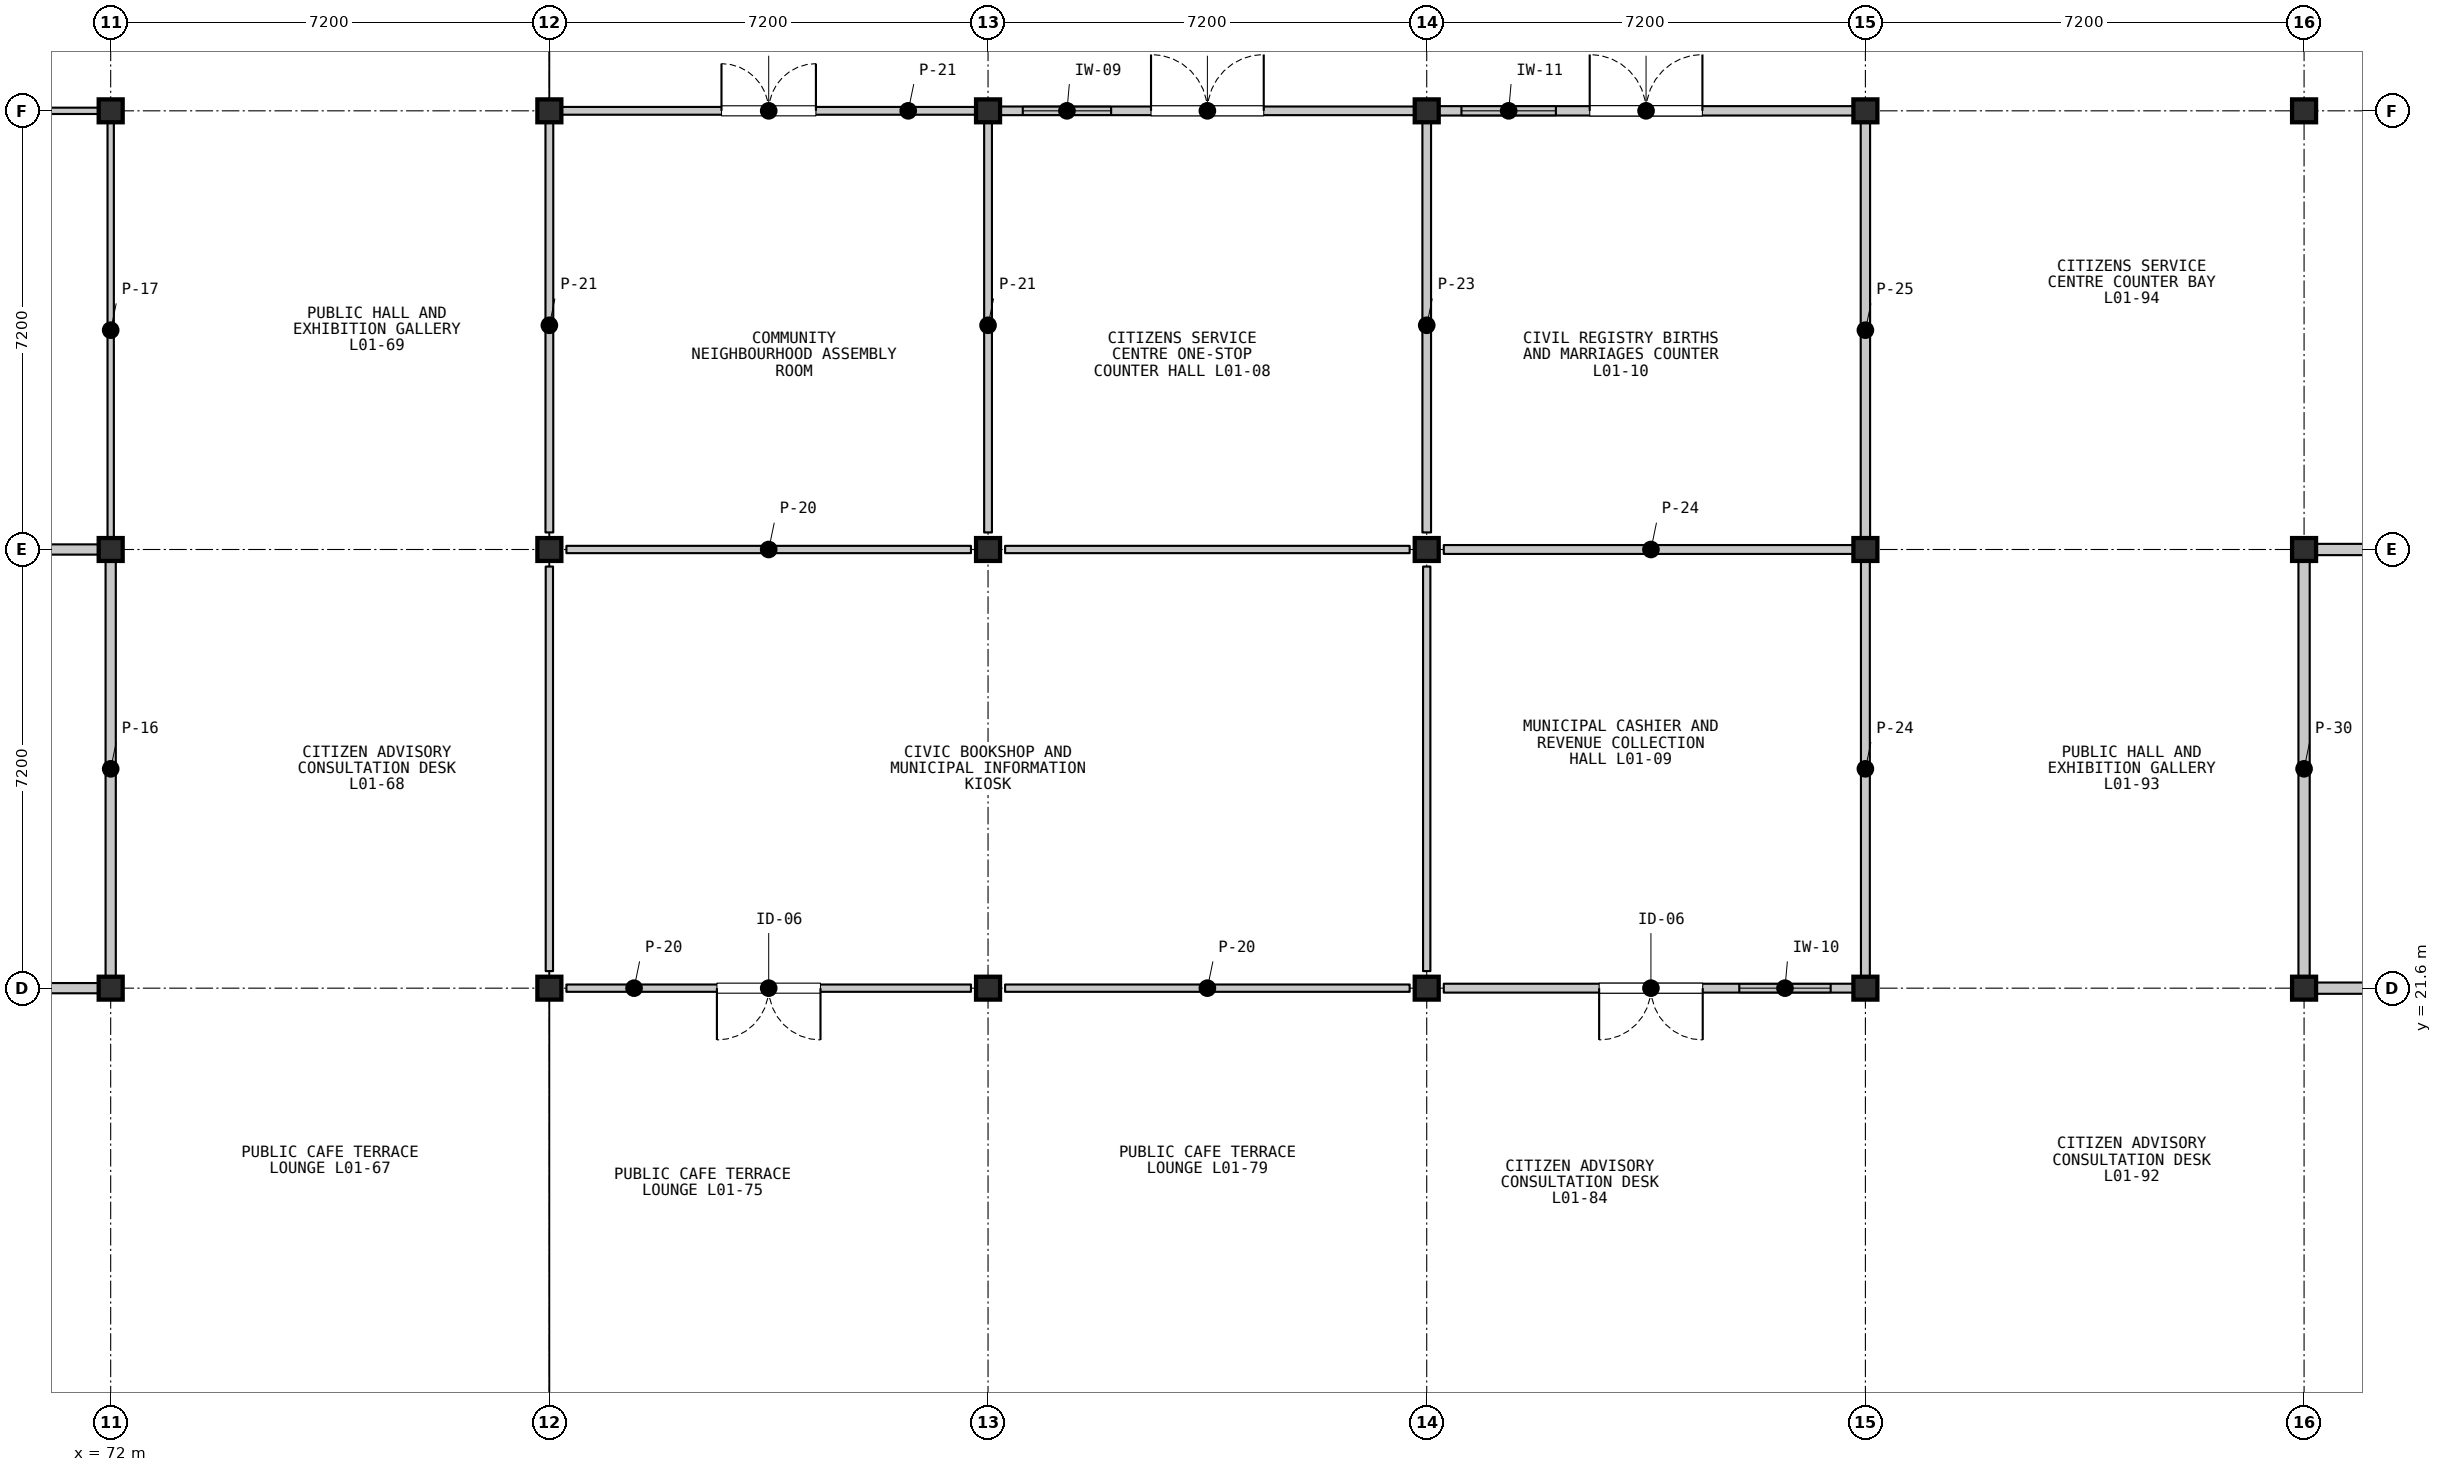
"""IFC4 building model, lengths in metres.
Left out: names, types, materials, properties, quantities, classifications, styles, units other than length and angle.
Written with IfcOpenShell. Run it as: python <this file> out.ifc"""

import sys

from ifc_helpers import new_model, si_unit, direction, frame, frame_2d, origin, origin_2d, place, context, subcontext, project, spatial, rectangle, i_section, extrude, element, fill, save


model = new_model("IFC4")
c1 = context("Model", 3, precision=1e-05, world=origin(), true_north=direction((0.0, 1.0)))
c2 = subcontext(c1, "Body", "Model", "MODEL_VIEW")
j1 = project(units=[si_unit("LENGTHUNIT", "METRE"), si_unit("PLANEANGLEUNIT", "RADIAN")], contexts=[c1])
p1 = place(None, origin())
s1 = spatial("IfcSite", under=j1, at=p1, CompositionType="ELEMENT")
p2 = place(p1, origin())
s2 = spatial("IfcBuilding", under=s1, at=p2, CompositionType="ELEMENT")
p3 = place(p2, origin())
s3 = spatial("IfcBuildingStorey", under=s2, at=p3, CompositionType="ELEMENT", Elevation=0.0)
for number, where, z_axis, x_axis in (
    (1, (72.0, 21.6, 0.0), (0.0, 0.0, 1.0), (1.0, 0.0, 0.0)),
    (2, (72.0, 28.8, 0.0), (0.0, 0.0, 1.0), (1.0, 0.0, 0.0)),
    (3, (72.0, 36.0, 0.0), (0.0, 0.0, 1.0), (1.0, 0.0, 0.0)),
    (4, (79.2, 21.6, 0.0), (0.0, 0.0, 1.0), (1.0, 0.0, 0.0)),
    (5, (79.2, 28.8, 0.0), (0.0, 0.0, 1.0), (1.0, 0.0, 0.0)),
    (6, (79.2, 36.0, 0.0), (0.0, 0.0, 1.0), (1.0, 0.0, 0.0)),
    (7, (86.4, 21.6, 0.0), (0.0, 0.0, 1.0), (1.0, 0.0, 0.0)),
    (8, (86.4, 28.8, 0.0), (0.0, 0.0, 1.0), (1.0, 0.0, 0.0)),
    (9, (86.4, 36.0, 0.0), (0.0, 0.0, 1.0), (1.0, 0.0, 0.0)),
    (10, (93.6, 21.6, 0.0), (0.0, 0.0, 1.0), (1.0, 0.0, 0.0)),
    (11, (93.6, 28.8, 0.0), (0.0, 0.0, 1.0), (1.0, 0.0, 0.0)),
    (12, (93.6, 36.0, 0.0), (0.0, 0.0, 1.0), (1.0, 0.0, 0.0)),
    (13, (100.8, 21.6, 0.0), (0.0, 0.0, 1.0), (1.0, 0.0, 0.0)),
    (14, (100.8, 28.8, 0.0), (0.0, 0.0, 1.0), (1.0, 0.0, 0.0)),
    (15, (100.8, 36.0, 0.0), (0.0, 0.0, 1.0), (1.0, 0.0, 0.0)),
    (16, (108.0, 21.6, 0.0), (0.0, 0.0, 1.0), (1.0, 0.0, 0.0)),
    (17, (108.0, 28.8, 0.0), (0.0, 0.0, 1.0), (1.0, 0.0, 0.0)),
    (18, (108.0, 36.0, 0.0), (0.0, 0.0, 1.0), (1.0, 0.0, 0.0)),
):
    element("IfcColumn", number, at=place(p3, frame(where, z_axis=z_axis, x_axis=x_axis)), inside=s3, PredefinedType="COLUMN", context=c2, shape_type="SweptSolid", body=[
        extrude(i_section(OverallWidth=0.394, OverallDepth=0.376, WebThickness=0.017, FlangeThickness=0.028, FilletRadius=0.015, at=origin_2d()), origin(), (0.0, 0.0, 1.0), 5.4),
    ])
p4 = place(p3, frame((71.88, 21.6, 0.0), z_axis=(0.0, 0.0, 1.0), x_axis=(-1.0, 0.0, 0.0)))
e19 = element("IfcWall", 19, at=p4, inside=s3, PredefinedType="PARTITIONING", context=c2, shape_type="SweptSolid", body=[
    extrude(rectangle(XDim=6.96, YDim=0.168, at=frame_2d((3.48, 0.0))), origin(), (0.0, 0.0, 1.0), 4.164),
])
p5 = place(p4, frame((2.63, 0.0, 0.0)))
e20 = element("IfcOpeningElement", 20, at=p5, cuts=e19, PredefinedType="OPENING", context=c2, shape_type="SweptSolid", body=[
    extrude(rectangle(XDim=1.7, YDim=2.35, at=frame_2d((0.85, 1.175))), frame((0.0, 0.094, 0.0), z_axis=(0.0, -1.0, 0.0), x_axis=(1.0, 0.0, 0.0)), (0.0, 0.0, 1.0), 0.188),
])
for number, where, z_axis, x_axis in (
    (21, (64.92, 28.8, 0.0), (0.0, 0.0, 1.0), (1.0, 0.0, 0.0)),
    (22, (72.0, 28.68, 0.0), (0.0, 0.0, 1.0), (0.0, -1.0, 0.0)),
):
    element("IfcWall", number, at=place(p3, frame(where, z_axis=z_axis, x_axis=x_axis)), inside=s3, PredefinedType="PARTITIONING", context=c2, shape_type="SweptSolid", body=[
        extrude(rectangle(XDim=6.96, YDim=0.168, at=frame_2d((3.48, 0.0))), origin(), (0.0, 0.0, 1.0), 4.588),
    ])
p6 = place(p3, frame((64.92, 36.0, 0.0), z_axis=(0.0, 0.0, 1.0), x_axis=(1.0, 0.0, 0.0)))
e23 = element("IfcWall", 23, at=p6, inside=s3, PredefinedType="PARTITIONING", context=c2, shape_type="SweptSolid", body=[
    extrude(rectangle(XDim=6.96, YDim=0.104, at=frame_2d((3.48, 0.0))), origin(), (0.0, 0.0, 1.0), 4.588),
])
p7 = place(p6, frame((2.555, 0.0, 0.0)))
e24 = element("IfcOpeningElement", 24, at=p7, cuts=e23, PredefinedType="OPENING", context=c2, shape_type="SweptSolid", body=[
    extrude(rectangle(XDim=1.85, YDim=2.45, at=frame_2d((0.925, 1.225))), frame((0.0, 0.062, 0.0), z_axis=(0.0, -1.0, 0.0), x_axis=(1.0, 0.0, 0.0)), (0.0, 0.0, 1.0), 0.124),
])
p8 = place(p3, frame((72.0, 35.88, 0.0), z_axis=(0.0, 0.0, 1.0), x_axis=(0.0, -1.0, 0.0)))
e25 = element("IfcWall", 25, at=p8, inside=s3, PredefinedType="PARTITIONING", context=c2, shape_type="SweptSolid", body=[
    extrude(rectangle(XDim=6.96, YDim=0.104, at=frame_2d((3.48, 0.0))), origin(), (0.0, 0.0, 1.0), 4.588),
])
p9 = place(p3, frame((86.12, 21.6, 0.0), z_axis=(0.0, 0.0, 1.0), x_axis=(-1.0, 0.0, 0.0)))
e26 = element("IfcWall", 26, at=p9, inside=s3, PredefinedType="PARTITIONING", context=c2, shape_type="SweptSolid", body=[
    extrude(rectangle(XDim=6.64, YDim=0.12, at=frame_2d((3.32, 0.0))), origin(), (0.0, 0.0, 1.0), 4.588),
])
p10 = place(p9, frame((2.47, 0.0, 0.0)))
e27 = element("IfcOpeningElement", 27, at=p10, cuts=e26, PredefinedType="OPENING", context=c2, shape_type="SweptSolid", body=[
    extrude(rectangle(XDim=1.7, YDim=2.35, at=frame_2d((0.85, 1.175))), frame((0.0, 0.07, 0.0), z_axis=(0.0, -1.0, 0.0), x_axis=(1.0, 0.0, 0.0)), (0.0, 0.0, 1.0), 0.14),
])
for number, where, z_axis, x_axis in (
    (28, (93.32, 21.6, 0.0), (0.0, 0.0, 1.0), (-1.0, 0.0, 0.0)),
    (29, (79.48, 28.8, 0.0), (0.0, 0.0, 1.0), (1.0, 0.0, 0.0)),
    (30, (86.68, 28.8, 0.0), (0.0, 0.0, 1.0), (1.0, 0.0, 0.0)),
):
    element("IfcWall", number, at=place(p3, frame(where, z_axis=z_axis, x_axis=x_axis)), inside=s3, PredefinedType="PARTITIONING", context=c2, shape_type="SweptSolid", body=[
        extrude(rectangle(XDim=6.64, YDim=0.12, at=frame_2d((3.32, 0.0))), origin(), (0.0, 0.0, 1.0), 4.588),
    ])
for number, where, z_axis, x_axis in (
    (31, (79.2, 21.88, 0.0), (0.0, 0.0, 1.0), (0.0, 1.0, 0.0)),
    (32, (93.6, 28.52, 0.0), (0.0, 0.0, 1.0), (0.0, -1.0, 0.0)),
):
    element("IfcWall", number, at=place(p3, frame(where, z_axis=z_axis, x_axis=x_axis)), inside=s3, PredefinedType="PARTITIONING", context=c2, shape_type="SweptSolid", body=[
        extrude(rectangle(XDim=6.64, YDim=0.12, at=frame_2d((3.32, 0.0))), origin(), (0.0, 0.0, 1.0), 4.657),
    ])
p11 = place(p3, frame((79.32, 36.0, 0.0), z_axis=(0.0, 0.0, 1.0), x_axis=(1.0, 0.0, 0.0)))
e33 = element("IfcWall", 33, at=p11, inside=s3, PredefinedType="PARTITIONING", context=c2, shape_type="SweptSolid", body=[
    extrude(rectangle(XDim=6.96, YDim=0.128, at=frame_2d((3.48, 0.0))), origin(), (0.0, 0.0, 1.0), 4.588),
])
p12 = place(p11, frame((2.705, 0.0, 0.0)))
e34 = element("IfcOpeningElement", 34, at=p12, cuts=e33, PredefinedType="OPENING", context=c2, shape_type="SweptSolid", body=[
    extrude(rectangle(XDim=1.55, YDim=2.3, at=frame_2d((0.775, 1.15))), frame((0.0, 0.074, 0.0), z_axis=(0.0, -1.0, 0.0), x_axis=(1.0, 0.0, 0.0)), (0.0, 0.0, 1.0), 0.148),
])
for number, where, z_axis, x_axis in (
    (35, (79.2, 29.08, 0.0), (0.0, 0.0, 1.0), (0.0, 1.0, 0.0)),
    (36, (86.4, 35.88, 0.0), (0.0, 0.0, 1.0), (0.0, -1.0, 0.0)),
):
    element("IfcWall", number, at=place(p3, frame(where, z_axis=z_axis, x_axis=x_axis)), inside=s3, PredefinedType="PARTITIONING", context=c2, shape_type="SweptSolid", body=[
        extrude(rectangle(XDim=6.8, YDim=0.128, at=frame_2d((3.4, 0.0))), origin(), (0.0, 0.0, 1.0), 4.588),
    ])
p13 = place(p3, frame((86.52, 36.0, 0.0), z_axis=(0.0, 0.0, 1.0), x_axis=(1.0, 0.0, 0.0)))
e37 = element("IfcWall", 37, at=p13, inside=s3, PredefinedType="PARTITIONING", context=c2, shape_type="SweptSolid", body=[
    extrude(rectangle(XDim=6.96, YDim=0.142, at=frame_2d((3.48, 0.0))), origin(), (0.0, 0.0, 1.0), 4.588),
])
p14 = place(p13, frame((2.555, 0.0, 0.0)))
e38 = element("IfcOpeningElement", 38, at=p14, cuts=e37, PredefinedType="OPENING", context=c2, shape_type="SweptSolid", body=[
    extrude(rectangle(XDim=1.85, YDim=2.45, at=frame_2d((0.925, 1.225))), frame((0.0, 0.081, 0.0), z_axis=(0.0, -1.0, 0.0), x_axis=(1.0, 0.0, 0.0)), (0.0, 0.0, 1.0), 0.162),
])
p15 = place(p13, frame((0.45, 0.0, 1.05)))
e39 = element("IfcOpeningElement", 39, at=p15, cuts=e37, PredefinedType="OPENING", context=c2, shape_type="SweptSolid", body=[
    extrude(rectangle(XDim=1.45, YDim=1.15, at=frame_2d((0.725, 0.575))), frame((0.0, 0.081, 0.0), z_axis=(0.0, -1.0, 0.0), x_axis=(1.0, 0.0, 0.0)), (0.0, 0.0, 1.0), 0.162),
])
p16 = place(p3, frame((93.6, 35.88, 0.0), z_axis=(0.0, 0.0, 1.0), x_axis=(0.0, -1.0, 0.0)))
e40 = element("IfcWall", 40, at=p16, inside=s3, PredefinedType="PARTITIONING", context=c2, shape_type="SweptSolid", body=[
    extrude(rectangle(XDim=6.8, YDim=0.142, at=frame_2d((3.4, 0.0))), origin(), (0.0, 0.0, 1.0), 4.588),
])
p17 = place(p3, frame((100.68, 21.6, 0.0), z_axis=(0.0, 0.0, 1.0), x_axis=(-1.0, 0.0, 0.0)))
e41 = element("IfcWall", 41, at=p17, inside=s3, PredefinedType="PARTITIONING", context=c2, shape_type="SweptSolid", body=[
    extrude(rectangle(XDim=6.8, YDim=0.146, at=frame_2d((3.4, 0.0))), origin(), (0.0, 0.0, 1.0), 4.164),
])
p18 = place(p17, frame((2.55, 0.0, 0.0)))
e42 = element("IfcOpeningElement", 42, at=p18, cuts=e41, PredefinedType="OPENING", context=c2, shape_type="SweptSolid", body=[
    extrude(rectangle(XDim=1.7, YDim=2.35, at=frame_2d((0.85, 1.175))), frame((0.0, 0.083, 0.0), z_axis=(0.0, -1.0, 0.0), x_axis=(1.0, 0.0, 0.0)), (0.0, 0.0, 1.0), 0.166),
])
p19 = place(p17, frame((0.45, 0.0, 1.05)))
e43 = element("IfcOpeningElement", 43, at=p19, cuts=e41, PredefinedType="OPENING", context=c2, shape_type="SweptSolid", body=[
    extrude(rectangle(XDim=1.5, YDim=1.15, at=frame_2d((0.75, 0.575))), frame((0.0, 0.083, 0.0), z_axis=(0.0, -1.0, 0.0), x_axis=(1.0, 0.0, 0.0)), (0.0, 0.0, 1.0), 0.166),
])
p20 = place(p3, frame((93.88, 28.8, 0.0), z_axis=(0.0, 0.0, 1.0), x_axis=(1.0, 0.0, 0.0)))
e44 = element("IfcWall", 44, at=p20, inside=s3, PredefinedType="PARTITIONING", context=c2, shape_type="SweptSolid", body=[
    extrude(rectangle(XDim=6.8, YDim=0.146, at=frame_2d((3.4, 0.0))), origin(), (0.0, 0.0, 1.0), 4.588),
])
p21 = place(p3, frame((100.8, 28.68, 0.0), z_axis=(0.0, 0.0, 1.0), x_axis=(0.0, -1.0, 0.0)))
e45 = element("IfcWall", 45, at=p21, inside=s3, PredefinedType="PARTITIONING", context=c2, shape_type="SweptSolid", body=[
    extrude(rectangle(XDim=6.96, YDim=0.146, at=frame_2d((3.48, 0.0))), origin(), (0.0, 0.0, 1.0), 4.588),
])
p22 = place(p3, frame((93.72, 36.0, 0.0), z_axis=(0.0, 0.0, 1.0), x_axis=(1.0, 0.0, 0.0)))
e46 = element("IfcWall", 46, at=p22, inside=s3, PredefinedType="PARTITIONING", context=c2, shape_type="SweptSolid", body=[
    extrude(rectangle(XDim=6.96, YDim=0.154, at=frame_2d((3.48, 0.0))), origin(), (0.0, 0.0, 1.0), 4.588),
])
p23 = place(p22, frame((2.555, 0.0, 0.0)))
e47 = element("IfcOpeningElement", 47, at=p23, cuts=e46, PredefinedType="OPENING", context=c2, shape_type="SweptSolid", body=[
    extrude(rectangle(XDim=1.85, YDim=2.45, at=frame_2d((0.925, 1.225))), frame((0.0, 0.087, 0.0), z_axis=(0.0, -1.0, 0.0), x_axis=(1.0, 0.0, 0.0)), (0.0, 0.0, 1.0), 0.174),
])
p24 = place(p22, frame((0.45, 0.0, 1.05)))
e48 = element("IfcOpeningElement", 48, at=p24, cuts=e46, PredefinedType="OPENING", context=c2, shape_type="SweptSolid", body=[
    extrude(rectangle(XDim=1.55, YDim=1.15, at=frame_2d((0.775, 0.575))), frame((0.0, 0.087, 0.0), z_axis=(0.0, -1.0, 0.0), x_axis=(1.0, 0.0, 0.0)), (0.0, 0.0, 1.0), 0.174),
])
p25 = place(p3, frame((100.8, 35.88, 0.0), z_axis=(0.0, 0.0, 1.0), x_axis=(0.0, -1.0, 0.0)))
e49 = element("IfcWall", 49, at=p25, inside=s3, PredefinedType="PARTITIONING", context=c2, shape_type="SweptSolid", body=[
    extrude(rectangle(XDim=6.96, YDim=0.154, at=frame_2d((3.48, 0.0))), origin(), (0.0, 0.0, 1.0), 4.428),
])
p26 = place(p3, frame((114.92, 21.6, 0.0), z_axis=(0.0, 0.0, 1.0), x_axis=(-1.0, 0.0, 0.0)))
e50 = element("IfcWall", 50, at=p26, inside=s3, PredefinedType="PARTITIONING", context=c2, shape_type="SweptSolid", body=[
    extrude(rectangle(XDim=6.8, YDim=0.185, at=frame_2d((3.4, 0.0))), origin(), (0.0, 0.0, 1.0), 4.164),
])
p27 = place(p26, frame((2.625, 0.0, 0.0)))
e51 = element("IfcOpeningElement", 51, at=p27, cuts=e50, PredefinedType="OPENING", context=c2, shape_type="SweptSolid", body=[
    extrude(rectangle(XDim=1.55, YDim=2.3, at=frame_2d((0.775, 1.15))), frame((0.0, 0.103, 0.0), z_axis=(0.0, -1.0, 0.0), x_axis=(1.0, 0.0, 0.0)), (0.0, 0.0, 1.0), 0.205),
])
p28 = place(p26, frame((0.45, 0.0, 1.05)))
e52 = element("IfcOpeningElement", 52, at=p28, cuts=e50, PredefinedType="OPENING", context=c2, shape_type="SweptSolid", body=[
    extrude(rectangle(XDim=1.9, YDim=1.22, at=frame_2d((0.95, 0.61))), frame((0.0, 0.103, 0.0), z_axis=(0.0, -1.0, 0.0), x_axis=(1.0, 0.0, 0.0)), (0.0, 0.0, 1.0), 0.205),
])
p29 = place(p3, frame((108.12, 28.8, 0.0), z_axis=(0.0, 0.0, 1.0), x_axis=(1.0, 0.0, 0.0)))
e53 = element("IfcWall", 53, at=p29, inside=s3, PredefinedType="PARTITIONING", context=c2, shape_type="SweptSolid", body=[
    extrude(rectangle(XDim=6.8, YDim=0.185, at=frame_2d((3.4, 0.0))), origin(), (0.0, 0.0, 1.0), 4.588),
])
p30 = place(p3, frame((108.0, 21.72, 0.0), z_axis=(0.0, 0.0, 1.0), x_axis=(0.0, 1.0, 0.0)))
e54 = element("IfcWall", 54, at=p30, inside=s3, PredefinedType="PARTITIONING", context=c2, shape_type="SweptSolid", body=[
    extrude(rectangle(XDim=6.96, YDim=0.185, at=frame_2d((3.48, 0.0))), origin(), (0.0, 0.0, 1.0), 4.588),
])
p31 = place(p10, origin())
e55 = element("IfcDoor", 55, at=p31, inside=s3, OperationType="DOUBLE_DOOR_SINGLE_SWING", PredefinedType="DOOR", context=c2, shape_type="SweptSolid", body=[
    extrude(rectangle(XDim=1.7, YDim=2.35, at=frame_2d((0.85, 1.175))), frame((0.0, 0.025, 0.0), z_axis=(0.0, -1.0, 0.0), x_axis=(1.0, 0.0, 0.0)), (0.0, 0.0, 1.0), 0.05),
])
fill(e27, e55)
p32 = place(p12, origin())
e56 = element("IfcDoor", 56, at=p32, inside=s3, OperationType="DOUBLE_DOOR_SINGLE_SWING", PredefinedType="DOOR", context=c2, shape_type="SweptSolid", body=[
    extrude(rectangle(XDim=1.55, YDim=2.3, at=frame_2d((0.775, 1.15))), frame((0.0, 0.025, 0.0), z_axis=(0.0, -1.0, 0.0), x_axis=(1.0, 0.0, 0.0)), (0.0, 0.0, 1.0), 0.05),
])
fill(e34, e56)
p33 = place(p14, origin())
e57 = element("IfcDoor", 57, at=p33, inside=s3, OperationType="DOUBLE_DOOR_SINGLE_SWING", PredefinedType="DOOR", context=c2, shape_type="SweptSolid", body=[
    extrude(rectangle(XDim=1.85, YDim=2.45, at=frame_2d((0.925, 1.225))), frame((0.0, 0.025, 0.0), z_axis=(0.0, -1.0, 0.0), x_axis=(1.0, 0.0, 0.0)), (0.0, 0.0, 1.0), 0.05),
])
fill(e38, e57)
p34 = place(p15, origin())
e58 = element("IfcWindow", 58, at=p34, inside=s3, PartitioningType="SINGLE_PANEL", PredefinedType="WINDOW", context=c2, shape_type="SweptSolid", body=[
    extrude(rectangle(XDim=1.45, YDim=1.15, at=frame_2d((0.725, 0.575))), frame((0.0, 0.03, 0.0), z_axis=(0.0, -1.0, 0.0), x_axis=(1.0, 0.0, 0.0)), (0.0, 0.0, 1.0), 0.06),
])
fill(e39, e58)
p35 = place(p18, origin())
e59 = element("IfcDoor", 59, at=p35, inside=s3, OperationType="DOUBLE_DOOR_SINGLE_SWING", PredefinedType="DOOR", context=c2, shape_type="SweptSolid", body=[
    extrude(rectangle(XDim=1.7, YDim=2.35, at=frame_2d((0.85, 1.175))), frame((0.0, 0.025, 0.0), z_axis=(0.0, -1.0, 0.0), x_axis=(1.0, 0.0, 0.0)), (0.0, 0.0, 1.0), 0.05),
])
fill(e42, e59)
p36 = place(p19, origin())
e60 = element("IfcWindow", 60, at=p36, inside=s3, PartitioningType="SINGLE_PANEL", PredefinedType="WINDOW", context=c2, shape_type="SweptSolid", body=[
    extrude(rectangle(XDim=1.5, YDim=1.15, at=frame_2d((0.75, 0.575))), frame((0.0, 0.03, 0.0), z_axis=(0.0, -1.0, 0.0), x_axis=(1.0, 0.0, 0.0)), (0.0, 0.0, 1.0), 0.06),
])
fill(e43, e60)
p37 = place(p23, origin())
e61 = element("IfcDoor", 61, at=p37, inside=s3, OperationType="DOUBLE_DOOR_SINGLE_SWING", PredefinedType="DOOR", context=c2, shape_type="SweptSolid", body=[
    extrude(rectangle(XDim=1.85, YDim=2.45, at=frame_2d((0.925, 1.225))), frame((0.0, 0.025, 0.0), z_axis=(0.0, -1.0, 0.0), x_axis=(1.0, 0.0, 0.0)), (0.0, 0.0, 1.0), 0.05),
])
fill(e47, e61)
p38 = place(p24, origin())
e62 = element("IfcWindow", 62, at=p38, inside=s3, PartitioningType="SINGLE_PANEL", PredefinedType="WINDOW", context=c2, shape_type="SweptSolid", body=[
    extrude(rectangle(XDim=1.55, YDim=1.15, at=frame_2d((0.775, 0.575))), frame((0.0, 0.03, 0.0), z_axis=(0.0, -1.0, 0.0), x_axis=(1.0, 0.0, 0.0)), (0.0, 0.0, 1.0), 0.06),
])
fill(e48, e62)
save(model, sys.argv[1])
